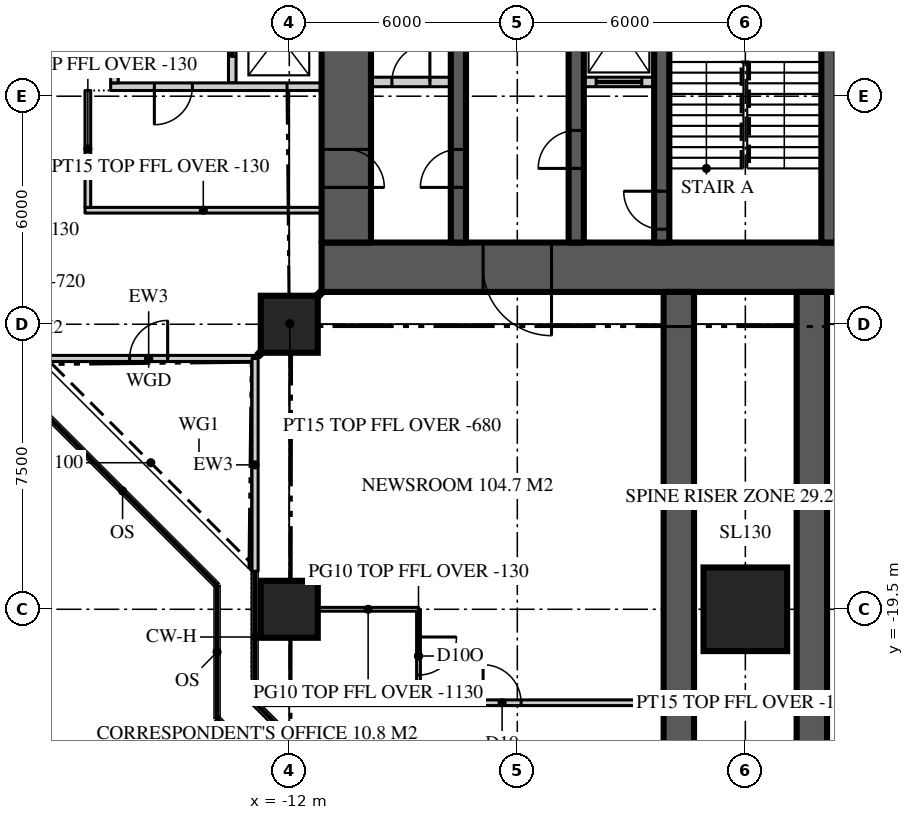
"""IFC4 building model, lengths in metres.
Left out: names, types, materials, properties, quantities, classifications, styles, units other than length and angle.
Written with IfcOpenShell. Run it as: python <this file> out.ifc"""

import sys

from ifc_helpers import new_model, si_unit, direction, frame, frame_2d, origin, origin_2d, place, context, subcontext, project, spatial, rectangle, extrude, element, fill, save


model = new_model("IFC4")
c1 = context("Model", 3, precision=1e-05, world=origin(), true_north=direction((0.0, 1.0)))
c2 = subcontext(c1, "Body", "Model", "MODEL_VIEW")
j1 = project(units=[si_unit("LENGTHUNIT", "METRE"), si_unit("PLANEANGLEUNIT", "RADIAN")], contexts=[c1])
p1 = place(None, origin())
s1 = spatial("IfcSite", under=j1, at=p1, CompositionType="ELEMENT")
p2 = place(p1, origin())
s2 = spatial("IfcBuilding", under=s1, at=p2, CompositionType="ELEMENT")
p3 = place(p2, frame((0.0, 0.0, 247.8)))
s3 = spatial("IfcBuildingStorey", under=s2, at=p3, CompositionType="ELEMENT", Elevation=247.8)
p4 = place(p3, frame((11.15, -10.5, 0.0), z_axis=(0.0, 0.0, 1.0), x_axis=(-1.0, 0.0, 0.0)))
e1 = element("IfcWall", 1, at=p4, inside=s3, PredefinedType="SHEAR", context=c2, shape_type="SweptSolid", body=[
    extrude(rectangle(XDim=22.3, YDim=1.3, at=frame_2d((11.15, 0.0))), origin(), (0.0, 0.0, 1.0), 3.9),
])
p5 = place(p4, frame((16.25, 0.0, 0.0)))
e2 = element("IfcOpeningElement", 2, at=p5, cuts=e1, PredefinedType="OPENING", context=c2, shape_type="SweptSolid", body=[
    extrude(rectangle(XDim=1.8, YDim=2.2, at=frame_2d((0.9, 1.1))), frame((0.0, 0.66, 0.0), z_axis=(0.0, -1.0, 0.0), x_axis=(1.0, 0.0, 0.0)), (0.0, 0.0, 1.0), 1.32),
])
p6 = place(p4, frame((4.25, 0.0, 0.0)))
e3 = element("IfcOpeningElement", 3, at=p6, cuts=e1, PredefinedType="OPENING", context=c2, shape_type="SweptSolid", body=[
    extrude(rectangle(XDim=1.8, YDim=2.2, at=frame_2d((0.9, 1.1))), frame((0.0, 0.66, 0.0), z_axis=(0.0, -1.0, 0.0), x_axis=(1.0, 0.0, 0.0)), (0.0, 0.0, 1.0), 1.32),
])
p7 = place(p3, frame((-10.5, 9.85, 0.0), z_axis=(0.0, 0.0, 1.0), x_axis=(0.0, -1.0, 0.0)))
e4 = element("IfcWall", 4, at=p7, inside=s3, PredefinedType="SHEAR", context=c2, shape_type="SweptSolid", body=[
    extrude(rectangle(XDim=19.7, YDim=1.3, at=frame_2d((9.85, 0.0))), origin(), (0.0, 0.0, 1.0), 3.9),
])
p8 = place(p7, frame((17.25, 0.0, 0.0)))
e5 = element("IfcOpeningElement", 5, at=p8, cuts=e4, PredefinedType="OPENING", context=c2, shape_type="SweptSolid", body=[
    extrude(rectangle(XDim=1.0, YDim=2.2, at=frame_2d((0.5, 1.1))), frame((0.0, 0.66, 0.0), z_axis=(0.0, -1.0, 0.0), x_axis=(1.0, 0.0, 0.0)), (0.0, 0.0, 1.0), 1.32),
])
for number, where, z_axis, x_axis in (
    (6, (-1.75, -11.15, 0.0), (0.0, 0.0, 1.0), (0.0, -1.0, 0.0)),
    (7, (1.75, -11.15, 0.0), (0.0, 0.0, 1.0), (0.0, -1.0, 0.0)),
):
    element("IfcWall", number, at=place(p3, frame(where, z_axis=z_axis, x_axis=x_axis)), inside=s3, PredefinedType="SHEAR", context=c2, shape_type="SweptSolid", body=[
        extrude(rectangle(XDim=15.25, YDim=0.8, at=frame_2d((7.625, 0.0))), origin(), (0.0, 0.0, 1.0), 3.9),
    ])
p9 = place(p3, frame((-12.0, -19.5, 0.0), z_axis=(0.0, 0.0, 1.0), x_axis=(1.0, 0.0, 0.0)))
e8 = element("IfcColumn", 8, at=p9, inside=s3, PredefinedType="COLUMN", context=c2, shape_type="SweptSolid", body=[
    extrude(rectangle(XDim=1.5, YDim=1.5, at=origin_2d()), origin(), (0.0, 0.0, 1.0), 3.9),
])
p10 = place(p3, frame((0.0, -19.5, 0.0), z_axis=(0.0, 0.0, 1.0), x_axis=(1.0, 0.0, 0.0)))
e9 = element("IfcColumn", 9, at=p10, inside=s3, PredefinedType="COLUMN", context=c2, shape_type="SweptSolid", body=[
    extrude(rectangle(XDim=2.2, YDim=2.2, at=origin_2d()), origin(), (0.0, 0.0, 1.0), 3.9),
])
p11 = place(p3, frame((-12.0, -12.0, 0.0), z_axis=(0.0, 0.0, 1.0), x_axis=(1.0, 0.0, 0.0)))
e10 = element("IfcColumn", 10, at=p11, inside=s3, PredefinedType="COLUMN", context=c2, shape_type="SweptSolid", body=[
    extrude(rectangle(XDim=1.5, YDim=1.5, at=origin_2d()), origin(), (0.0, 0.0, 1.0), 3.9),
])
p12 = place(p3, frame((-18.5, -12.9, 0.0), z_axis=(0.0, 0.0, 1.0), x_axis=(1.0, 0.0, 0.0)))
e11 = element("IfcWall", 11, at=p12, inside=s3, PredefinedType="SOLIDWALL", context=c2, shape_type="SweptSolid", body=[
    extrude(rectangle(XDim=5.6, YDim=0.16, at=frame_2d((2.8, 0.0))), origin(), (0.0, 0.0, 1.0), 3.77),
])
p13 = place(p12, frame((2.3, 0.0, 0.0)))
e12 = element("IfcOpeningElement", 12, at=p13, cuts=e11, PredefinedType="OPENING", context=c2, shape_type="SweptSolid", body=[
    extrude(rectangle(XDim=1.0, YDim=2.2, at=frame_2d((0.5, 1.1))), frame((0.0, 0.09, 0.0), z_axis=(0.0, -1.0, 0.0), x_axis=(1.0, 0.0, 0.0)), (0.0, 0.0, 1.0), 0.18),
])
p14 = place(p3, frame((-12.9, -12.9, 0.0), z_axis=(0.0, 0.0, 1.0), x_axis=(0.0, -1.0, 0.0)))
e13 = element("IfcWall", 13, at=p14, inside=s3, PredefinedType="SOLIDWALL", context=c2, shape_type="SweptSolid", body=[
    extrude(rectangle(XDim=5.6, YDim=0.16, at=frame_2d((2.8, 0.0))), origin(), (0.0, 0.0, 1.0), 3.77),
])
p15 = place(p3, frame((-7.55, -9.85, 0.0), z_axis=(0.0, 0.0, 1.0), x_axis=(0.0, 1.0, 0.0)))
e14 = element("IfcWall", 14, at=p15, inside=s3, PredefinedType="SHEAR", context=c2, shape_type="SweptSolid", body=[
    extrude(rectangle(XDim=19.7, YDim=0.4, at=frame_2d((9.85, 0.0))), origin(), (0.0, 0.0, 1.0), 3.9),
])
p16 = place(p15, frame((1.45, 0.0, 0.0)))
e15 = element("IfcOpeningElement", 15, at=p16, cuts=e14, PredefinedType="OPENING", context=c2, shape_type="SweptSolid", body=[
    extrude(rectangle(XDim=1.0, YDim=2.2, at=frame_2d((0.5, 1.1))), frame((0.0, 0.21, 0.0), z_axis=(0.0, -1.0, 0.0), x_axis=(1.0, 0.0, 0.0)), (0.0, 0.0, 1.0), 0.42),
])
p17 = place(p15, frame((17.3, 0.0, 0.0)))
e16 = element("IfcOpeningElement", 16, at=p17, cuts=e14, PredefinedType="OPENING", context=c2, shape_type="SweptSolid", body=[
    extrude(rectangle(XDim=0.9, YDim=2.1, at=frame_2d((0.45, 1.05))), frame((0.0, 0.21, 0.0), z_axis=(0.0, -1.0, 0.0), x_axis=(1.0, 0.0, 0.0)), (0.0, 0.0, 1.0), 0.42),
])
p18 = place(p3, frame((-4.45, -9.85, 0.0), z_axis=(0.0, 0.0, 1.0), x_axis=(0.0, 1.0, 0.0)))
e17 = element("IfcWall", 17, at=p18, inside=s3, PredefinedType="SHEAR", context=c2, shape_type="SweptSolid", body=[
    extrude(rectangle(XDim=19.7, YDim=0.4, at=frame_2d((9.85, 0.0))), origin(), (0.0, 0.0, 1.0), 3.9),
])
p19 = place(p18, frame((1.95, 0.0, 0.0)))
e18 = element("IfcOpeningElement", 18, at=p19, cuts=e17, PredefinedType="OPENING", context=c2, shape_type="SweptSolid", body=[
    extrude(rectangle(XDim=1.0, YDim=2.2, at=frame_2d((0.5, 1.1))), frame((0.0, 0.21, 0.0), z_axis=(0.0, -1.0, 0.0), x_axis=(1.0, 0.0, 0.0)), (0.0, 0.0, 1.0), 0.42),
])
p20 = place(p18, frame((17.25, 0.0, 0.0)))
e19 = element("IfcOpeningElement", 19, at=p20, cuts=e17, PredefinedType="OPENING", context=c2, shape_type="SweptSolid", body=[
    extrude(rectangle(XDim=1.0, YDim=2.1, at=frame_2d((0.5, 1.05))), frame((0.0, 0.21, 0.0), z_axis=(0.0, -1.0, 0.0), x_axis=(1.0, 0.0, 0.0)), (0.0, 0.0, 1.0), 0.42),
])
p21 = place(p3, frame((-2.2, -9.85, 0.0), z_axis=(0.0, 0.0, 1.0), x_axis=(0.0, 1.0, 0.0)))
e20 = element("IfcWall", 20, at=p21, inside=s3, PredefinedType="SHEAR", context=c2, shape_type="SweptSolid", body=[
    extrude(rectangle(XDim=19.7, YDim=0.4, at=frame_2d((9.85, 0.0))), origin(), (0.0, 0.0, 1.0), 3.9),
])
p22 = place(p21, frame((0.35, 0.0, 0.0)))
e21 = element("IfcOpeningElement", 21, at=p22, cuts=e20, PredefinedType="OPENING", context=c2, shape_type="SweptSolid", body=[
    extrude(rectangle(XDim=1.0, YDim=2.2, at=frame_2d((0.5, 1.1))), frame((0.0, 0.21, 0.0), z_axis=(0.0, -1.0, 0.0), x_axis=(1.0, 0.0, 0.0)), (0.0, 0.0, 1.0), 0.42),
])
p23 = place(p3, frame((2.2, 9.85, 0.0), z_axis=(0.0, 0.0, 1.0), x_axis=(0.0, -1.0, 0.0)))
e22 = element("IfcWall", 22, at=p23, inside=s3, PredefinedType="SHEAR", context=c2, shape_type="SweptSolid", body=[
    extrude(rectangle(XDim=19.7, YDim=0.4, at=frame_2d((9.85, 0.0))), origin(), (0.0, 0.0, 1.0), 3.9),
])
p24 = place(p23, frame((0.35, 0.0, 0.0)))
e23 = element("IfcOpeningElement", 23, at=p24, cuts=e22, PredefinedType="OPENING", context=c2, shape_type="SweptSolid", body=[
    extrude(rectangle(XDim=1.0, YDim=2.2, at=frame_2d((0.5, 1.1))), frame((0.0, 0.21, 0.0), z_axis=(0.0, -1.0, 0.0), x_axis=(1.0, 0.0, 0.0)), (0.0, 0.0, 1.0), 0.42),
])
p25 = place(p3, frame((-9.85, -5.625, 0.0), z_axis=(0.0, 0.0, 1.0), x_axis=(1.0, 0.0, 0.0)))
e24 = element("IfcWall", 24, at=p25, inside=s3, PredefinedType="SOLIDWALL", context=c2, shape_type="SweptSolid", body=[
    extrude(rectangle(XDim=2.1, YDim=0.25, at=frame_2d((1.05, 0.0))), origin(), (0.0, 0.0, 1.0), 3.7),
])
p26 = place(p25, frame((0.55, 0.0, 0.0)))
e25 = element("IfcOpeningElement", 25, at=p26, cuts=e24, PredefinedType="OPENING", context=c2, shape_type="SweptSolid", body=[
    extrude(rectangle(XDim=1.0, YDim=2.2, at=frame_2d((0.5, 1.1))), frame((0.0, 0.135, 0.0), z_axis=(0.0, -1.0, 0.0), x_axis=(1.0, 0.0, 0.0)), (0.0, 0.0, 1.0), 0.27),
])
p27 = place(p3, frame((-4.25, -5.625, 0.0), z_axis=(0.0, 0.0, 1.0), x_axis=(1.0, 0.0, 0.0)))
e26 = element("IfcWall", 26, at=p27, inside=s3, PredefinedType="SOLIDWALL", context=c2, shape_type="SweptSolid", body=[
    extrude(rectangle(XDim=1.85, YDim=0.25, at=frame_2d((0.925, 0.0))), origin(), (0.0, 0.0, 1.0), 3.7),
])
p28 = place(p27, frame((0.325, 0.0, 0.0)))
e27 = element("IfcOpeningElement", 27, at=p28, cuts=e26, PredefinedType="OPENING", context=c2, shape_type="SweptSolid", body=[
    extrude(rectangle(XDim=1.2, YDim=2.2, at=frame_2d((0.6, 1.1))), frame((0.0, 0.135, 0.0), z_axis=(0.0, -1.0, 0.0), x_axis=(1.0, 0.0, 0.0)), (0.0, 0.0, 1.0), 0.27),
])
p29 = place(p3, frame((-12.786, -21.959, 0.0), z_axis=(0.0, 0.0, 1.0), x_axis=(1.0, 0.0, 0.0)))
e28 = element("IfcWall", 28, at=p29, inside=s3, PredefinedType="PARTITIONING", context=c2, shape_type="SweptSolid", body=[
    extrude(rectangle(XDim=25.573, YDim=0.15, at=frame_2d((12.786, 0.0))), origin(), (0.0, 0.0, 1.0), 3.77),
])
p30 = place(p29, frame((18.687, 0.0, 0.0)))
e29 = element("IfcOpeningElement", 29, at=p30, cuts=e28, PredefinedType="OPENING", context=c2, shape_type="SweptSolid", body=[
    extrude(rectangle(XDim=1.0, YDim=2.2, at=frame_2d((0.5, 1.1))), frame((0.0, 0.085, 0.0), z_axis=(0.0, -1.0, 0.0), x_axis=(1.0, 0.0, 0.0)), (0.0, 0.0, 1.0), 0.17),
])
p31 = place(p29, frame((5.886, 0.0, 0.0)))
e30 = element("IfcOpeningElement", 30, at=p31, cuts=e28, PredefinedType="OPENING", context=c2, shape_type="SweptSolid", body=[
    extrude(rectangle(XDim=1.0, YDim=2.2, at=frame_2d((0.5, 1.1))), frame((0.0, 0.085, 0.0), z_axis=(0.0, -1.0, 0.0), x_axis=(1.0, 0.0, 0.0)), (0.0, 0.0, 1.0), 0.17),
])
p32 = place(p3, frame((-8.6, -19.5, 0.0), z_axis=(0.0, 0.0, 1.0), x_axis=(0.0, -1.0, 0.0)))
e31 = element("IfcWall", 31, at=p32, inside=s3, PredefinedType="PARTITIONING", context=c2, shape_type="SweptSolid", body=[
    extrude(rectangle(XDim=2.459, YDim=0.1, at=frame_2d((1.229, 0.0))), origin(), (0.0, 0.0, 1.0), 3.77),
])
p33 = place(p32, frame((0.729, 0.0, 0.0)))
e32 = element("IfcOpeningElement", 32, at=p33, cuts=e31, PredefinedType="OPENING", context=c2, shape_type="SweptSolid", body=[
    extrude(rectangle(XDim=1.0, YDim=2.2, at=frame_2d((0.5, 1.1))), frame((0.0, 0.06, 0.0), z_axis=(0.0, -1.0, 0.0), x_axis=(1.0, 0.0, 0.0)), (0.0, 0.0, 1.0), 0.12),
])
p34 = place(p3, frame((-8.6, -19.5, 0.0), z_axis=(0.0, 0.0, 1.0), x_axis=(-1.0, 0.0, 0.0)))
e33 = element("IfcWall", 33, at=p34, inside=s3, PredefinedType="PARTITIONING", context=c2, shape_type="SweptSolid", body=[
    extrude(rectangle(XDim=2.65, YDim=0.1, at=frame_2d((1.325, 0.0))), origin(), (0.0, 0.0, 1.0), 2.77),
])
p35 = place(p3, frame((-13.5, 5.65, 0.0), z_axis=(0.0, 0.0, 1.0), x_axis=(0.0, -1.0, 0.0)))
e34 = element("IfcWall", 34, at=p35, inside=s3, PredefinedType="SOLIDWALL", context=c2, shape_type="SweptSolid", body=[
    extrude(rectangle(XDim=11.3, YDim=0.2, at=frame_2d((5.65, 0.0))), origin(), (0.0, 0.0, 1.0), 3.7),
])
p36 = place(p35, frame((0.7, 0.0, 0.0)))
e35 = element("IfcOpeningElement", 35, at=p36, cuts=e34, PredefinedType="OPENING", context=c2, shape_type="SweptSolid", body=[
    extrude(rectangle(XDim=1.1, YDim=2.2, at=frame_2d((0.55, 1.1))), frame((0.0, 0.11, 0.0), z_axis=(0.0, -1.0, 0.0), x_axis=(1.0, 0.0, 0.0)), (0.0, 0.0, 1.0), 0.22),
])
p37 = place(p35, frame((3.4, 0.0, 0.0)))
e36 = element("IfcOpeningElement", 36, at=p37, cuts=e34, PredefinedType="OPENING", context=c2, shape_type="SweptSolid", body=[
    extrude(rectangle(XDim=1.1, YDim=2.2, at=frame_2d((0.55, 1.1))), frame((0.0, 0.11, 0.0), z_axis=(0.0, -1.0, 0.0), x_axis=(1.0, 0.0, 0.0)), (0.0, 0.0, 1.0), 0.22),
])
p38 = place(p35, frame((6.8, 0.0, 0.0)))
e37 = element("IfcOpeningElement", 37, at=p38, cuts=e34, PredefinedType="OPENING", context=c2, shape_type="SweptSolid", body=[
    extrude(rectangle(XDim=1.1, YDim=2.2, at=frame_2d((0.55, 1.1))), frame((0.0, 0.11, 0.0), z_axis=(0.0, -1.0, 0.0), x_axis=(1.0, 0.0, 0.0)), (0.0, 0.0, 1.0), 0.22),
])
p39 = place(p35, frame((9.5, 0.0, 0.0)))
e38 = element("IfcOpeningElement", 38, at=p39, cuts=e34, PredefinedType="OPENING", context=c2, shape_type="SweptSolid", body=[
    extrude(rectangle(XDim=1.1, YDim=2.2, at=frame_2d((0.55, 1.1))), frame((0.0, 0.11, 0.0), z_axis=(0.0, -1.0, 0.0), x_axis=(1.0, 0.0, 0.0)), (0.0, 0.0, 1.0), 0.22),
])
p40 = place(p3, frame((-11.15, -5.75, 0.0), z_axis=(0.0, 0.0, 1.0), x_axis=(-1.0, 0.0, 0.0)))
e39 = element("IfcWall", 39, at=p40, inside=s3, PredefinedType="SOLIDWALL", context=c2, shape_type="SweptSolid", body=[
    extrude(rectangle(XDim=5.55, YDim=0.2, at=frame_2d((2.775, 0.0))), origin(), (0.0, 0.0, 1.0), 3.7),
])
p41 = place(p40, frame((3.4, 0.0, 0.0)))
e40 = element("IfcOpeningElement", 40, at=p41, cuts=e39, PredefinedType="OPENING", context=c2, shape_type="SweptSolid", body=[
    extrude(rectangle(XDim=1.0, YDim=2.2, at=frame_2d((0.5, 1.1))), frame((0.0, 0.11, 0.0), z_axis=(0.0, -1.0, 0.0), x_axis=(1.0, 0.0, 0.0)), (0.0, 0.0, 1.0), 0.22),
])
p42 = place(p3, frame((-16.6, 5.65, 0.0), z_axis=(0.0, 0.0, 1.0), x_axis=(0.0, -1.0, 0.0)))
e41 = element("IfcWall", 41, at=p42, inside=s3, PredefinedType="SOLIDWALL", context=c2, shape_type="SweptSolid", body=[
    extrude(rectangle(XDim=11.3, YDim=0.2, at=frame_2d((5.65, 0.0))), origin(), (0.0, 0.0, 1.0), 3.18),
])
p43 = place(p42, frame((4.75, 0.0, 0.0)))
e42 = element("IfcOpeningElement", 42, at=p43, cuts=e41, PredefinedType="OPENING", context=c2, shape_type="SweptSolid", body=[
    extrude(rectangle(XDim=1.8, YDim=2.2, at=frame_2d((0.9, 1.1))), frame((0.0, 0.11, 0.0), z_axis=(0.0, -1.0, 0.0), x_axis=(1.0, 0.0, 0.0)), (0.0, 0.0, 1.0), 0.22),
])
p44 = place(p3, frame((-11.15, -11.15, 0.0), z_axis=(0.0, 0.0, 1.0), x_axis=(-0.707106781187, -0.707106781187, 0.0)))
e43 = element("IfcWall", 43, at=p44, inside=s3, PredefinedType="PARTITIONING", context=c2, shape_type="SweptSolid", body=[
    extrude(rectangle(XDim=2.362, YDim=0.15, at=frame_2d((1.181, 0.0))), origin(), (0.0, 0.0, 1.0), 3.22),
])
p45 = place(p3, frame((-11.15, -9.0, 0.0), z_axis=(0.0, 0.0, 1.0), x_axis=(-1.0, 0.0, 0.0)))
e44 = element("IfcWall", 44, at=p45, inside=s3, PredefinedType="PARTITIONING", context=c2, shape_type="SweptSolid", body=[
    extrude(rectangle(XDim=6.225, YDim=0.15, at=frame_2d((3.113, 0.0))), origin(), (0.0, 0.0, 1.0), 3.77),
])
p46 = place(p3, frame((-17.3, -5.85, 0.0), z_axis=(0.0, 0.0, 1.0), x_axis=(0.0, -1.0, 0.0)))
e45 = element("IfcWall", 45, at=p46, inside=s3, PredefinedType="PARTITIONING", context=c2, shape_type="SweptSolid", body=[
    extrude(rectangle(XDim=3.075, YDim=0.15, at=frame_2d((1.538, 0.0))), origin(), (0.0, 0.0, 1.0), 3.77),
])
p47 = place(p13, origin())
e46 = element("IfcDoor", 46, at=p47, inside=s3, OperationType="SINGLE_SWING_RIGHT", PredefinedType="DOOR", context=c2, shape_type="SweptSolid", body=[
    extrude(rectangle(XDim=1.0, YDim=2.2, at=frame_2d((0.5, 1.1))), frame((0.0, 0.025, 0.0), z_axis=(0.0, -1.0, 0.0), x_axis=(1.0, 0.0, 0.0)), (0.0, 0.0, 1.0), 0.05),
])
fill(e12, e46)
p48 = place(p5, origin())
e47 = element("IfcDoor", 47, at=p48, inside=s3, OperationType="DOUBLE_DOOR_DOUBLE_SWING", PredefinedType="DOOR", context=c2, shape_type="SweptSolid", body=[
    extrude(rectangle(XDim=1.8, YDim=2.2, at=frame_2d((0.9, 1.1))), frame((0.0, 0.025, 0.0), z_axis=(0.0, -1.0, 0.0), x_axis=(1.0, 0.0, 0.0)), (0.0, 0.0, 1.0), 0.05),
])
fill(e2, e47)
p49 = place(p16, origin())
e48 = element("IfcDoor", 48, at=p49, inside=s3, OperationType="SINGLE_SWING_LEFT", PredefinedType="DOOR", context=c2, shape_type="SweptSolid", body=[
    extrude(rectangle(XDim=1.0, YDim=2.2, at=frame_2d((0.5, 1.1))), frame((0.0, 0.025, 0.0), z_axis=(0.0, -1.0, 0.0), x_axis=(1.0, 0.0, 0.0)), (0.0, 0.0, 1.0), 0.05),
])
fill(e15, e48)
p50 = place(p8, origin())
e49 = element("IfcDoor", 49, at=p50, inside=s3, OperationType="SINGLE_SWING_RIGHT", PredefinedType="DOOR", context=c2, shape_type="SweptSolid", body=[
    extrude(rectangle(XDim=1.0, YDim=2.2, at=frame_2d((0.5, 1.1))), frame((0.0, 0.025, 0.0), z_axis=(0.0, -1.0, 0.0), x_axis=(1.0, 0.0, 0.0)), (0.0, 0.0, 1.0), 0.05),
])
fill(e5, e49)
p51 = place(p19, origin())
e50 = element("IfcDoor", 50, at=p51, inside=s3, OperationType="SINGLE_SWING_LEFT", PredefinedType="DOOR", context=c2, shape_type="SweptSolid", body=[
    extrude(rectangle(XDim=1.0, YDim=2.2, at=frame_2d((0.5, 1.1))), frame((0.0, 0.025, 0.0), z_axis=(0.0, -1.0, 0.0), x_axis=(1.0, 0.0, 0.0)), (0.0, 0.0, 1.0), 0.05),
])
fill(e18, e50)
p52 = place(p22, origin())
e51 = element("IfcDoor", 51, at=p52, inside=s3, OperationType="SINGLE_SWING_RIGHT", PredefinedType="DOOR", context=c2, shape_type="SweptSolid", body=[
    extrude(rectangle(XDim=1.0, YDim=2.2, at=frame_2d((0.5, 1.1))), frame((0.0, 0.025, 0.0), z_axis=(0.0, -1.0, 0.0), x_axis=(1.0, 0.0, 0.0)), (0.0, 0.0, 1.0), 0.05),
])
fill(e21, e51)
p53 = place(p28, origin())
e52 = element("IfcDoor", 52, at=p53, inside=s3, OperationType="SLIDING_TO_LEFT", PredefinedType="DOOR", context=c2, shape_type="SweptSolid", body=[
    extrude(rectangle(XDim=1.2, YDim=2.2, at=frame_2d((0.6, 1.1))), frame((0.0, 0.025, 0.0), z_axis=(0.0, -1.0, 0.0), x_axis=(1.0, 0.0, 0.0)), (0.0, 0.0, 1.0), 0.05),
])
fill(e27, e52)
p54 = place(p31, origin())
e53 = element("IfcDoor", 53, at=p54, inside=s3, OperationType="SINGLE_SWING_LEFT", PredefinedType="DOOR", context=c2, shape_type="SweptSolid", body=[
    extrude(rectangle(XDim=1.0, YDim=2.2, at=frame_2d((0.5, 1.1))), frame((0.0, 0.025, 0.0), z_axis=(0.0, -1.0, 0.0), x_axis=(1.0, 0.0, 0.0)), (0.0, 0.0, 1.0), 0.05),
])
fill(e30, e53)
p55 = place(p33, origin())
e54 = element("IfcDoor", 54, at=p55, inside=s3, OperationType="SINGLE_SWING_LEFT", PredefinedType="DOOR", context=c2, shape_type="SweptSolid", body=[
    extrude(rectangle(XDim=1.0, YDim=2.2, at=frame_2d((0.5, 1.1))), frame((0.0, 0.025, 0.0), z_axis=(0.0, -1.0, 0.0), x_axis=(1.0, 0.0, 0.0)), (0.0, 0.0, 1.0), 0.05),
])
fill(e32, e54)
p56 = place(p39, origin())
e55 = element("IfcDoor", 55, at=p56, inside=s3, OperationType="SLIDING_TO_LEFT", PredefinedType="DOOR", context=c2, shape_type="SweptSolid", body=[
    extrude(rectangle(XDim=1.1, YDim=2.2, at=frame_2d((0.55, 1.1))), frame((0.0, 0.025, 0.0), z_axis=(0.0, -1.0, 0.0), x_axis=(1.0, 0.0, 0.0)), (0.0, 0.0, 1.0), 0.05),
])
fill(e38, e55)
p57 = place(p41, origin())
e56 = element("IfcDoor", 56, at=p57, inside=s3, OperationType="SINGLE_SWING_RIGHT", PredefinedType="DOOR", context=c2, shape_type="SweptSolid", body=[
    extrude(rectangle(XDim=1.0, YDim=2.2, at=frame_2d((0.5, 1.1))), frame((0.0, 0.025, 0.0), z_axis=(0.0, -1.0, 0.0), x_axis=(1.0, 0.0, 0.0)), (0.0, 0.0, 1.0), 0.05),
])
fill(e40, e56)
p58 = place(p26, origin())
e57 = element("IfcDoor", 57, at=p58, inside=s3, OperationType="SINGLE_SWING_RIGHT", PredefinedType="DOOR", context=c2, shape_type="SweptSolid", body=[
    extrude(rectangle(XDim=1.0, YDim=2.2, at=frame_2d((0.5, 1.1))), frame((0.0, 0.025, 0.0), z_axis=(0.0, -1.0, 0.0), x_axis=(1.0, 0.0, 0.0)), (0.0, 0.0, 1.0), 0.05),
])
fill(e25, e57)
save(model, sys.argv[1])
